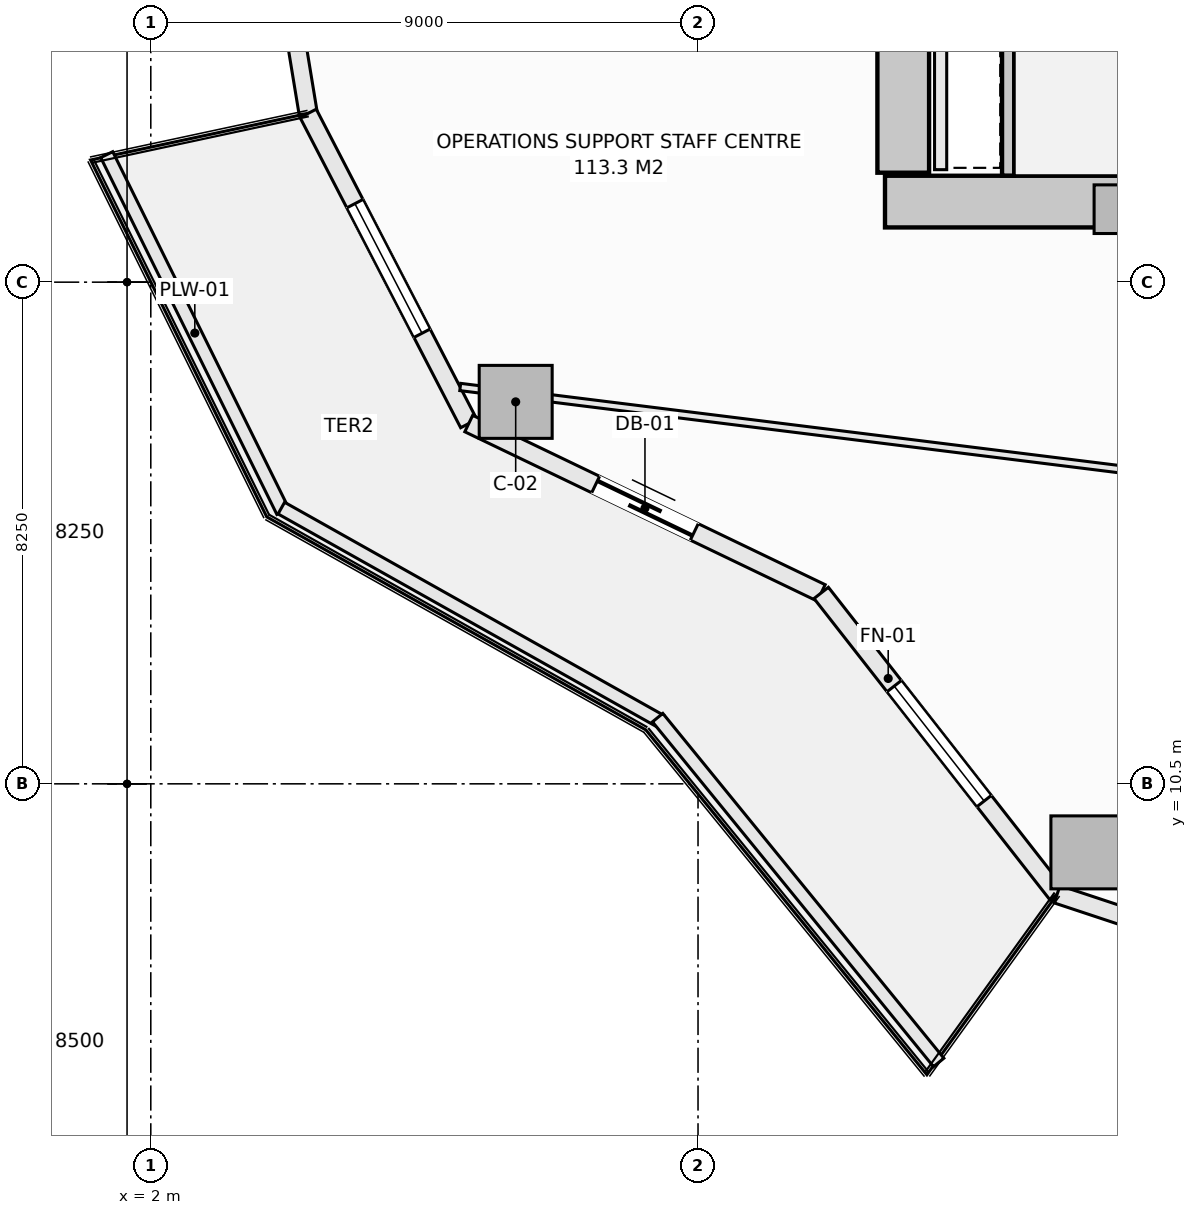
"""IFC4 building model, lengths in metres.
Left out: names, types, materials, properties, quantities, classifications, styles, units other than length and angle.
Written with IfcOpenShell. Run it as: python <this file> out.ifc"""

import sys

from ifc_helpers import new_model, si_unit, direction, frame, frame_2d, origin, origin_2d, place, context, subcontext, project, spatial, rectangle, extrude, element, fill, save


model = new_model("IFC4")
c1 = context("Model", 3, precision=1e-05, world=origin(), true_north=direction((0.0, 1.0)))
c2 = subcontext(c1, "Body", "Model", "MODEL_VIEW")
j1 = project(units=[si_unit("LENGTHUNIT", "METRE"), si_unit("PLANEANGLEUNIT", "RADIAN")], contexts=[c1])
p1 = place(None, origin())
s1 = spatial("IfcSite", under=j1, at=p1, CompositionType="ELEMENT")
p2 = place(p1, origin())
s2 = spatial("IfcBuilding", under=s1, at=p2, CompositionType="ELEMENT")
p3 = place(p2, frame((0.0, 0.0, 76.55)))
s3 = spatial("IfcBuildingStorey", under=s2, at=p3, CompositionType="ELEMENT", Elevation=76.55)
p4 = place(p3, frame((14.075, 20.075, -0.28), z_axis=(0.0, 0.0, 1.0), x_axis=(1.0, 0.0, 0.0)))
e1 = element("IfcWall", 1, at=p4, inside=s3, PredefinedType="SHEAR", context=c2, shape_type="SweptSolid", body=[
    extrude(rectangle(XDim=13.85, YDim=0.85, at=frame_2d((6.925, 0.0))), origin(), (0.0, 0.0, 1.0), 3.85),
])
p5 = place(p3, frame((14.375, 20.55, -0.28), z_axis=(0.0, 0.0, 1.0), x_axis=(0.0, 1.0, 0.0)))
e2 = element("IfcWall", 2, at=p5, inside=s3, PredefinedType="SHEAR", context=c2, shape_type="SweptSolid", body=[
    extrude(rectangle(XDim=12.9, YDim=0.85, at=frame_2d((6.45, 0.0))), origin(), (0.0, 0.0, 1.0), 3.85),
])
for number, where, z_axis, x_axis in (
    (3, (8.001, 16.781, -0.28), (0.0, 0.0, 1.0), (1.0, 0.0, 0.0)),
    (4, (17.404, 9.373, -0.28), (0.0, 0.0, 1.0), (1.0, 0.0, 0.0)),
):
    element("IfcColumn", number, at=place(p3, frame(where, z_axis=z_axis, x_axis=x_axis)), inside=s3, PredefinedType="COLUMN", context=c2, shape_type="SweptSolid", body=[
        extrude(rectangle(XDim=1.2, YDim=1.2, at=origin_2d()), origin(), (0.0, 0.0, 1.0), 3.85),
    ])
p6 = place(p3, frame((17.914, 19.95, -0.28), z_axis=(0.0, 0.0, 1.0), x_axis=(1.0, 0.0, 0.0)))
e5 = element("IfcColumn", 5, at=p6, inside=s3, PredefinedType="PILASTER", context=c2, shape_type="SweptSolid", body=[
    extrude(rectangle(XDim=0.8, YDim=0.8, at=origin_2d()), origin(), (0.0, 0.0, 1.0), 3.85),
])
p7 = place(p3, frame((3.688, 27.0, 0.0), z_axis=(0.0, 0.0, 1.0), x_axis=(0.162386212206, -0.986727276447, 0.0)))
e6 = element("IfcWall", 6, at=p7, inside=s3, PredefinedType="SOLIDWALL", context=c2, shape_type="SweptSolid", body=[
    extrude(rectangle(XDim=5.548, YDim=0.3, at=frame_2d((2.774, 0.0))), origin(), (0.0, 0.0, 1.0), 3.093),
])
p8 = place(p7, frame((2.05, 0.0, 0.85)))
e7 = element("IfcOpeningElement", 7, at=p8, cuts=e6, PredefinedType="OPENING", context=c2, shape_type="SweptSolid", body=[
    extrude(rectangle(XDim=2.4, YDim=1.9, at=frame_2d((1.2, 0.95))), frame((0.0, 0.16, 0.0), z_axis=(0.0, -1.0, 0.0), x_axis=(1.0, 0.0, 0.0)), (0.0, 0.0, 1.0), 0.32),
])
p9 = place(p3, frame((4.588, 21.526, 0.0), z_axis=(0.0, 0.0, 1.0), x_axis=(0.459800981414, -0.888021991558, 0.0)))
e8 = element("IfcWall", 8, at=p9, inside=s3, PredefinedType="SOLIDWALL", context=c2, shape_type="SweptSolid", body=[
    extrude(rectangle(XDim=5.744, YDim=0.3, at=frame_2d((2.872, 0.0))), origin(), (0.0, 0.0, 1.0), 3.093),
])
p10 = place(p9, frame((1.672, 0.0, 0.85)))
e9 = element("IfcOpeningElement", 9, at=p10, cuts=e8, PredefinedType="OPENING", context=c2, shape_type="SweptSolid", body=[
    extrude(rectangle(XDim=2.4, YDim=1.9, at=frame_2d((1.2, 0.95))), frame((0.0, 0.16, 0.0), z_axis=(0.0, -1.0, 0.0), x_axis=(1.0, 0.0, 0.0)), (0.0, 0.0, 1.0), 0.32),
])
p11 = place(p3, frame((7.229, 16.425, 0.0), z_axis=(0.0, 0.0, 1.0), x_axis=(0.901354747727, -0.433081538224, 0.0)))
e10 = element("IfcWall", 10, at=p11, inside=s3, PredefinedType="SOLIDWALL", context=c2, shape_type="SweptSolid", body=[
    extrude(rectangle(XDim=6.431, YDim=0.3, at=frame_2d((3.215, 0.0))), origin(), (0.0, 0.0, 1.0), 3.093),
])
p12 = place(p11, frame((2.315, 0.0, 0.0)))
e11 = element("IfcOpeningElement", 11, at=p12, cuts=e10, PredefinedType="OPENING", context=c2, shape_type="SweptSolid", body=[
    extrude(rectangle(XDim=1.8, YDim=2.25, at=frame_2d((0.9, 1.125))), frame((0.0, 0.16, 0.0), z_axis=(0.0, -1.0, 0.0), x_axis=(1.0, 0.0, 0.0)), (0.0, 0.0, 1.0), 0.32),
])
p13 = place(p3, frame((13.026, 13.64, 0.0), z_axis=(0.0, 0.0, 1.0), x_axis=(0.616434798832, -0.78740595552, 0.0)))
e12 = element("IfcWall", 12, at=p13, inside=s3, PredefinedType="SOLIDWALL", context=c2, shape_type="SweptSolid", body=[
    extrude(rectangle(XDim=6.294, YDim=0.3, at=frame_2d((3.147, 0.0))), origin(), (0.0, 0.0, 1.0), 3.093),
])
p14 = place(p13, frame((1.947, 0.0, 0.85)))
e13 = element("IfcOpeningElement", 13, at=p14, cuts=e12, PredefinedType="OPENING", context=c2, shape_type="SweptSolid", body=[
    extrude(rectangle(XDim=2.4, YDim=1.9, at=frame_2d((1.2, 0.95))), frame((0.0, 0.16, 0.0), z_axis=(0.0, -1.0, 0.0), x_axis=(1.0, 0.0, 0.0)), (0.0, 0.0, 1.0), 0.32),
])
p15 = place(p3, frame((16.906, 8.684, 0.0), z_axis=(0.0, 0.0, 1.0), x_axis=(0.949245153629, -0.314537181127, 0.0)))
e14 = element("IfcWall", 14, at=p15, inside=s3, PredefinedType="SOLIDWALL", context=c2, shape_type="SweptSolid", body=[
    extrude(rectangle(XDim=6.717, YDim=0.3, at=frame_2d((3.358, 0.0))), origin(), (0.0, 0.0, 1.0), 3.093),
])
p16 = place(p15, frame((2.159, 0.0, 0.85)))
e15 = element("IfcOpeningElement", 15, at=p16, cuts=e14, PredefinedType="OPENING", context=c2, shape_type="SweptSolid", body=[
    extrude(rectangle(XDim=2.4, YDim=1.9, at=frame_2d((1.2, 0.95))), frame((0.0, 0.16, 0.0), z_axis=(0.0, -1.0, 0.0), x_axis=(1.0, 0.0, 0.0)), (0.0, 0.0, 1.0), 0.32),
])
p17 = place(p3, frame((1.275, 20.847, 0.0), z_axis=(0.0, 0.0, 1.0), x_axis=(0.442686636348, -0.89667638644, 0.0)))
e16 = element("IfcWall", 16, at=p17, inside=s3, PredefinedType="PARAPET", context=c2, shape_type="SweptSolid", body=[
    extrude(rectangle(XDim=6.545, YDim=0.22, at=frame_2d((3.272, 0.0))), origin(), (0.0, 0.0, 1.0), 0.52),
])
p18 = place(p3, frame((4.147, 15.034, 0.0), z_axis=(0.0, 0.0, 1.0), x_axis=(0.871775109335, -0.489906275468, 0.0)))
e17 = element("IfcWall", 17, at=p18, inside=s3, PredefinedType="PARAPET", context=c2, shape_type="SweptSolid", body=[
    extrude(rectangle(XDim=7.152, YDim=0.22, at=frame_2d((3.576, 0.0))), origin(), (0.0, 0.0, 1.0), 0.52),
])
p19 = place(p3, frame((10.336, 11.589, 0.0), z_axis=(0.0, 0.0, 1.0), x_axis=(0.631819273026, -0.775115737315, 0.0)))
e18 = element("IfcWall", 18, at=p19, inside=s3, PredefinedType="PARAPET", context=c2, shape_type="SweptSolid", body=[
    extrude(rectangle(XDim=7.316, YDim=0.22, at=frame_2d((3.658, 0.0))), origin(), (0.0, 0.0, 1.0), 0.52),
])
p20 = place(p3, frame((16.1, 20.502, -0.28), z_axis=(0.0, 0.0, 1.0), x_axis=(0.0, 1.0, 0.0)))
e19 = element("IfcWall", 19, at=p20, inside=s3, PredefinedType="SHEAR", context=c2, shape_type="SweptSolid", body=[
    extrude(rectangle(XDim=3.036, YDim=0.2, at=frame_2d((1.518, 0.0))), origin(), (0.0, 0.0, 1.0), 3.85),
])
p21 = place(p3, frame((14.99, 20.6, 0.0), z_axis=(0.0, 0.0, 1.0), x_axis=(0.0, 1.0, 0.0)))
e20 = element("IfcWall", 20, at=p21, inside=s3, PredefinedType="SOLIDWALL", context=c2, shape_type="SweptSolid", body=[
    extrude(rectangle(XDim=2.85, YDim=0.2, at=frame_2d((1.425, 0.0))), origin(), (0.0, 0.0, 1.0), 3.57),
])
p22 = place(p3, frame((7.089, 17.026, 0.0), z_axis=(0.0, 0.0, 1.0), x_axis=(0.992316064114, -0.123728852337, 0.0)))
e21 = element("IfcWall", 21, at=p22, inside=s3, PredefinedType="PARTITIONING", context=c2, shape_type="SweptSolid", body=[
    extrude(rectangle(XDim=20.138, YDim=0.12, at=frame_2d((10.069, 0.0))), origin(), (0.0, 0.0, 1.0), 3.205),
])
p23 = place(p10, origin())
e22 = element("IfcWindow", 22, at=p23, inside=s3, PartitioningType="SINGLE_PANEL", PredefinedType="WINDOW", context=c2, shape_type="SweptSolid", body=[
    extrude(rectangle(XDim=2.4, YDim=1.9, at=frame_2d((1.2, 0.95))), frame((0.0, 0.03, 0.0), z_axis=(0.0, -1.0, 0.0), x_axis=(1.0, 0.0, 0.0)), (0.0, 0.0, 1.0), 0.06),
])
fill(e9, e22)
p24 = place(p12, frame((1.8, 0.0, 0.0), z_axis=(0.0, 0.0, 1.0), x_axis=(-1.0, 0.0, 0.0)))
e23 = element("IfcDoor", 23, at=p24, inside=s3, OperationType="SLIDING_TO_LEFT", PredefinedType="DOOR", context=c2, shape_type="SweptSolid", body=[
    extrude(rectangle(XDim=1.8, YDim=2.25, at=frame_2d((0.9, 1.125))), frame((0.0, 0.025, 0.0), z_axis=(0.0, -1.0, 0.0), x_axis=(1.0, 0.0, 0.0)), (0.0, 0.0, 1.0), 0.05),
])
fill(e11, e23)
p25 = place(p14, origin())
e24 = element("IfcWindow", 24, at=p25, inside=s3, PartitioningType="SINGLE_PANEL", PredefinedType="WINDOW", context=c2, shape_type="SweptSolid", body=[
    extrude(rectangle(XDim=2.4, YDim=1.9, at=frame_2d((1.2, 0.95))), frame((0.0, 0.03, 0.0), z_axis=(0.0, -1.0, 0.0), x_axis=(1.0, 0.0, 0.0)), (0.0, 0.0, 1.0), 0.06),
])
fill(e13, e24)
save(model, sys.argv[1])
